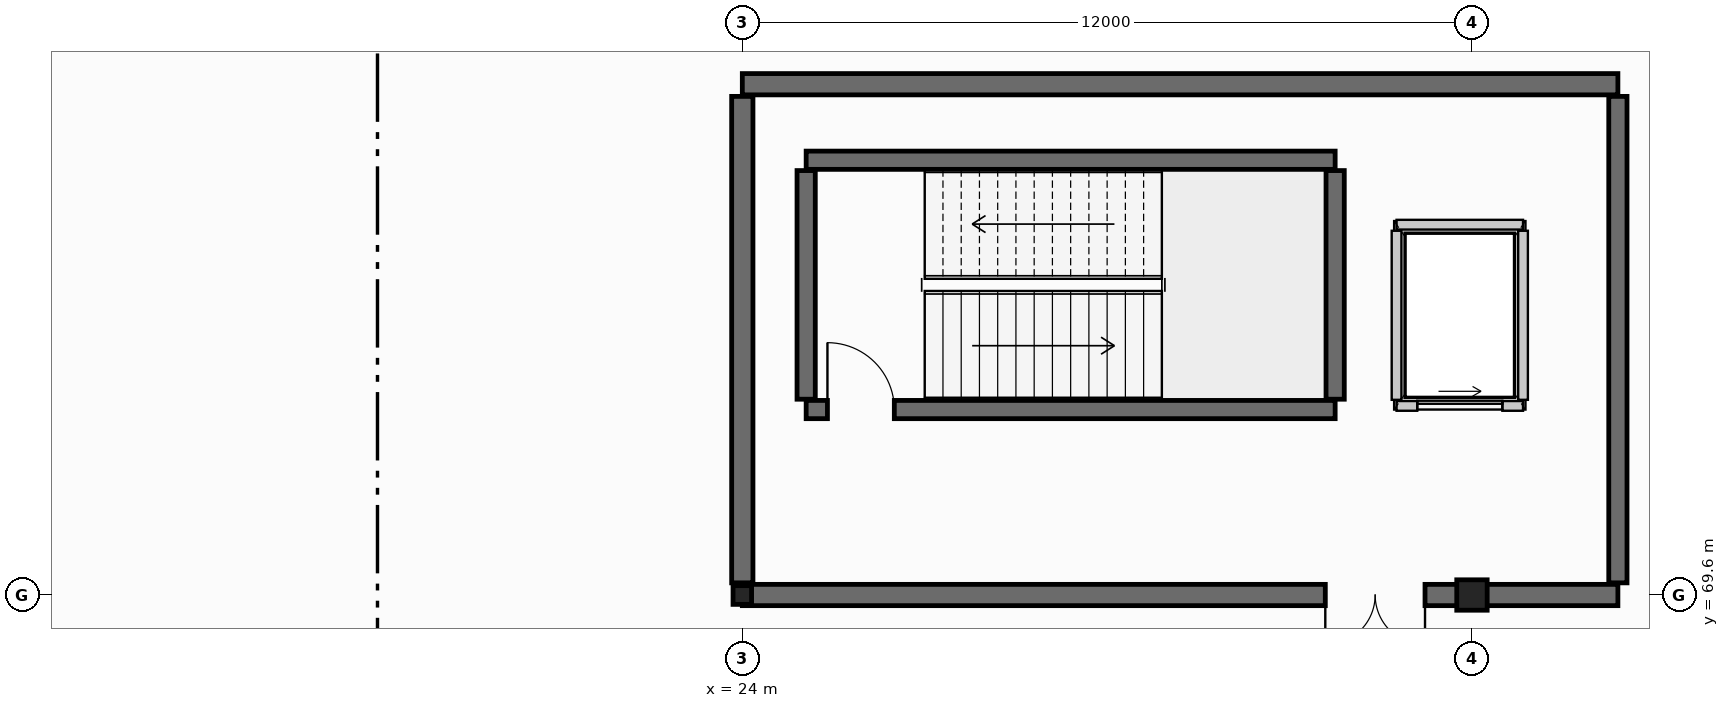
"""IFC4 building model, lengths in metres.
Left out: names, types, materials, properties, quantities, classifications, styles, units other than length and angle.
Written with IfcOpenShell. Run it as: python <this file> out.ifc"""

import sys

from ifc_helpers import new_model, si_unit, direction, frame, frame_2d, origin, origin_2d, place, context, subcontext, project, spatial, rectangle, i_section, extrude, element, fill, save


model = new_model("IFC4")
c1 = context("Model", 3, precision=1e-05, world=origin(), true_north=direction((0.0, 1.0)))
c2 = subcontext(c1, "Body", "Model", "MODEL_VIEW")
j1 = project(units=[si_unit("LENGTHUNIT", "METRE"), si_unit("PLANEANGLEUNIT", "RADIAN")], contexts=[c1])
p1 = place(None, origin())
s1 = spatial("IfcSite", under=j1, at=p1, CompositionType="ELEMENT")
p2 = place(p1, origin())
s2 = spatial("IfcBuilding", under=s1, at=p2, CompositionType="ELEMENT")
p3 = place(p2, frame((0.0, 0.0, -4.8)))
s3 = spatial("IfcBuildingStorey", under=s2, at=p3, CompositionType="ELEMENT", Elevation=-4.8)
p4 = place(p3, frame((24.0, 69.6, 0.0), z_axis=(0.0, 0.0, 1.0), x_axis=(1.0, 0.0, 0.0)))
e1 = element("IfcColumn", 1, at=p4, inside=s3, PredefinedType="COLUMN", context=c2, shape_type="SweptSolid", body=[
    extrude(i_section(OverallWidth=0.305, OverallDepth=0.308, WebThickness=0.01, FlangeThickness=0.015, at=origin_2d()), origin(), (0.0, 0.0, 1.0), 4.8),
])
p5 = place(p3, frame((36.0, 69.6, 0.0), z_axis=(0.0, 0.0, 1.0), x_axis=(0.0, 1.0, 0.0)))
e2 = element("IfcColumn", 2, at=p5, inside=s3, PredefinedType="COLUMN", context=c2, shape_type="SweptSolid", body=[
    extrude(rectangle(XDim=0.5, YDim=0.5, at=origin_2d()), origin(), (0.0, 0.0, 1.0), 4.8),
])
p6 = place(p3, frame((24.0, 78.0, 0.0), z_axis=(0.0, 0.0, 1.0), x_axis=(1.0, 0.0, 0.0)))
e3 = element("IfcWall", 3, at=p6, inside=s3, PredefinedType="SHEAR", context=c2, shape_type="SweptSolid", body=[
    extrude(rectangle(XDim=14.4, YDim=0.35, at=frame_2d((7.2, 0.0))), origin(), (0.0, 0.0, 1.0), 4.8),
])
p7 = place(p3, frame((38.4, 69.6, 0.0), z_axis=(0.0, 0.0, 1.0), x_axis=(-1.0, 0.0, 0.0)))
e4 = element("IfcWall", 4, at=p7, inside=s3, PredefinedType="SHEAR", context=c2, shape_type="SweptSolid", body=[
    extrude(rectangle(XDim=14.4, YDim=0.35, at=frame_2d((7.2, 0.0))), origin(), (0.0, 0.0, 1.0), 4.8),
])
p8 = place(p7, frame((3.172, 0.0, 0.0)))
e5 = element("IfcOpeningElement", 5, at=p8, cuts=e4, PredefinedType="OPENING", context=c2, shape_type="SweptSolid", body=[
    extrude(rectangle(XDim=1.64, YDim=2.2, at=frame_2d((0.82, 1.1))), frame((0.0, 0.185, 0.0), z_axis=(0.0, -1.0, 0.0), x_axis=(1.0, 0.0, 0.0)), (0.0, 0.0, 1.0), 0.37),
])
p9 = place(p3, frame((24.0, 69.8, 0.0), z_axis=(0.0, 0.0, 1.0), x_axis=(0.0, 1.0, 0.0)))
e6 = element("IfcWall", 6, at=p9, inside=s3, PredefinedType="SHEAR", context=c2, shape_type="SweptSolid", body=[
    extrude(rectangle(XDim=8.0, YDim=0.35, at=frame_2d((4.0, 0.0))), origin(), (0.0, 0.0, 1.0), 4.8),
])
p10 = place(p3, frame((38.4, 77.8, 0.0), z_axis=(0.0, 0.0, 1.0), x_axis=(0.0, -1.0, 0.0)))
e7 = element("IfcWall", 7, at=p10, inside=s3, PredefinedType="SHEAR", context=c2, shape_type="SweptSolid", body=[
    extrude(rectangle(XDim=8.0, YDim=0.3, at=frame_2d((4.0, 0.0))), origin(), (0.0, 0.0, 1.0), 4.8),
])
p11 = place(p3, frame((25.05, 72.65, 0.0), z_axis=(0.0, 0.0, 1.0), x_axis=(1.0, 0.0, 0.0)))
e8 = element("IfcWall", 8, at=p11, inside=s3, PredefinedType="SHEAR", context=c2, shape_type="SweptSolid", body=[
    extrude(rectangle(XDim=8.7, YDim=0.3, at=frame_2d((4.35, 0.0))), origin(), (0.0, 0.0, 1.0), 4.8),
])
p12 = place(p11, frame((0.35, 0.0, 0.0)))
e9 = element("IfcOpeningElement", 9, at=p12, cuts=e8, PredefinedType="OPENING", context=c2, shape_type="SweptSolid", body=[
    extrude(rectangle(XDim=1.1, YDim=2.15, at=frame_2d((0.55, 1.075))), frame((0.0, 0.16, 0.0), z_axis=(0.0, -1.0, 0.0), x_axis=(1.0, 0.0, 0.0)), (0.0, 0.0, 1.0), 0.32),
])
p13 = place(p3, frame((33.75, 76.75, 0.0), z_axis=(0.0, 0.0, 1.0), x_axis=(-1.0, 0.0, 0.0)))
e10 = element("IfcWall", 10, at=p13, inside=s3, PredefinedType="SHEAR", context=c2, shape_type="SweptSolid", body=[
    extrude(rectangle(XDim=8.7, YDim=0.3, at=frame_2d((4.35, 0.0))), origin(), (0.0, 0.0, 1.0), 4.8),
])
for number, where, z_axis, x_axis in (
    (11, (25.05, 72.82, 0.0), (0.0, 0.0, 1.0), (0.0, 1.0, 0.0)),
    (12, (33.75, 72.82, 0.0), (0.0, 0.0, 1.0), (0.0, 1.0, 0.0)),
):
    element("IfcWall", number, at=place(p3, frame(where, z_axis=z_axis, x_axis=x_axis)), inside=s3, PredefinedType="SHEAR", context=c2, shape_type="SweptSolid", body=[
        extrude(rectangle(XDim=3.76, YDim=0.3, at=frame_2d((1.88, 0.0))), origin(), (0.0, 0.0, 1.0), 4.8),
    ])
p14 = place(p3, frame((34.76, 72.71, 0.0), z_axis=(0.0, 0.0, 1.0), x_axis=(1.0, 0.0, 0.0)))
e13 = element("IfcWall", 13, at=p14, inside=s3, PredefinedType="PARTITIONING", context=c2, shape_type="SweptSolid", body=[
    extrude(rectangle(XDim=2.08, YDim=0.16, at=frame_2d((1.04, 0.0))), origin(), (0.0, 0.0, 1.0), 4.43),
])
p15 = place(p14, frame((0.34, 0.0, 0.0)))
e14 = element("IfcOpeningElement", 14, at=p15, cuts=e13, PredefinedType="OPENING", context=c2, shape_type="SweptSolid", body=[
    extrude(rectangle(XDim=1.4, YDim=2.2, at=frame_2d((0.7, 1.1))), frame((0.0, 0.09, 0.0), z_axis=(0.0, -1.0, 0.0), x_axis=(1.0, 0.0, 0.0)), (0.0, 0.0, 1.0), 0.18),
])
p16 = place(p3, frame((36.84, 75.69, 0.0), z_axis=(0.0, 0.0, 1.0), x_axis=(-1.0, 0.0, 0.0)))
e15 = element("IfcWall", 15, at=p16, inside=s3, PredefinedType="PARTITIONING", context=c2, shape_type="SweptSolid", body=[
    extrude(rectangle(XDim=2.08, YDim=0.16, at=frame_2d((1.04, 0.0))), origin(), (0.0, 0.0, 1.0), 4.43),
])
for number, where, z_axis, x_axis in (
    (16, (34.76, 75.59, 0.0), (0.0, 0.0, 1.0), (0.0, -1.0, 0.0)),
    (17, (36.84, 72.81, 0.0), (0.0, 0.0, 1.0), (0.0, 1.0, 0.0)),
):
    element("IfcWall", number, at=place(p3, frame(where, z_axis=z_axis, x_axis=x_axis)), inside=s3, PredefinedType="PARTITIONING", context=c2, shape_type="SweptSolid", body=[
        extrude(rectangle(XDim=2.78, YDim=0.16, at=frame_2d((1.39, 0.0))), origin(), (0.0, 0.0, 1.0), 4.43),
    ])
p17 = place(p15, origin())
e18 = element("IfcDoor", 18, at=p17, inside=s3, OperationType="SLIDING_TO_LEFT", PredefinedType="DOOR", context=c2, shape_type="SweptSolid", body=[
    extrude(rectangle(XDim=1.4, YDim=2.2, at=frame_2d((0.7, 1.1))), frame((0.0, 0.025, 0.0), z_axis=(0.0, -1.0, 0.0), x_axis=(1.0, 0.0, 0.0)), (0.0, 0.0, 1.0), 0.05),
])
fill(e14, e18)
p18 = place(p12, origin())
e19 = element("IfcDoor", 19, at=p18, inside=s3, OperationType="SINGLE_SWING_LEFT", PredefinedType="DOOR", context=c2, shape_type="SweptSolid", body=[
    extrude(rectangle(XDim=1.1, YDim=2.15, at=frame_2d((0.55, 1.075))), frame((0.0, 0.025, 0.0), z_axis=(0.0, -1.0, 0.0), x_axis=(1.0, 0.0, 0.0)), (0.0, 0.0, 1.0), 0.05),
])
fill(e9, e19)
p19 = place(p8, origin())
e20 = element("IfcDoor", 20, at=p19, inside=s3, OperationType="DOUBLE_DOOR_SINGLE_SWING", PredefinedType="DOOR", context=c2, shape_type="SweptSolid", body=[
    extrude(rectangle(XDim=1.64, YDim=2.2, at=frame_2d((0.82, 1.1))), frame((0.0, 0.025, 0.0), z_axis=(0.0, -1.0, 0.0), x_axis=(1.0, 0.0, 0.0)), (0.0, 0.0, 1.0), 0.05),
])
fill(e5, e20)
save(model, sys.argv[1])
